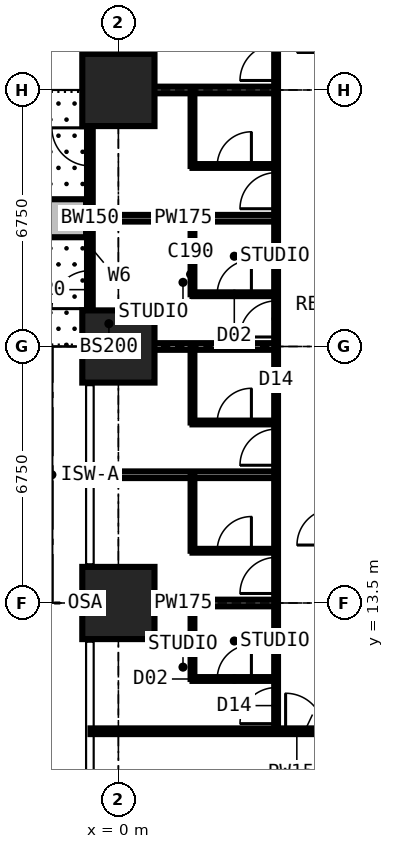
"""IFC4 building model, lengths in metres.
Left out: names, types, materials, properties, quantities, classifications, styles, units other than length and angle.
Written with IfcOpenShell. Run it as: python <this file> out.ifc"""

import sys

from ifc_helpers import new_model, si_unit, direction, frame, frame_2d, origin, origin_2d, place, context, subcontext, project, spatial, rectangle, extrude, element, fill, save


model = new_model("IFC4")
c1 = context("Model", 3, precision=1e-05, world=origin(), true_north=direction((0.0, 1.0)))
c2 = subcontext(c1, "Body", "Model", "MODEL_VIEW")
j1 = project(units=[si_unit("LENGTHUNIT", "METRE"), si_unit("PLANEANGLEUNIT", "RADIAN")], contexts=[c1])
p1 = place(None, origin())
s1 = spatial("IfcSite", under=j1, at=p1, CompositionType="ELEMENT")
p2 = place(p1, origin())
s2 = spatial("IfcBuilding", under=s1, at=p2, CompositionType="ELEMENT")
p3 = place(p2, frame((0.0, 0.0, 36.0)))
s3 = spatial("IfcBuildingStorey", under=s2, at=p3, CompositionType="ELEMENT", Elevation=36.0)
for number, where, z_axis, x_axis in (
    (1, (0.0, 13.5, 0.0), (0.0, 0.0, 1.0), (1.0, 0.0, 0.0)),
    (2, (0.0, 20.25, 0.0), (0.0, 0.0, 1.0), (1.0, 0.0, 0.0)),
    (3, (0.0, 27.0, 0.0), (0.0, 0.0, 1.0), (1.0, 0.0, 0.0)),
):
    element("IfcColumn", number, at=place(p3, frame(where, z_axis=z_axis, x_axis=x_axis)), inside=s3, PredefinedType="COLUMN", context=c2, shape_type="SweptSolid", body=[
        extrude(rectangle(XDim=1.9, YDim=1.9, at=origin_2d()), origin(), (0.0, 0.0, 1.0), 3.6),
    ])
p4 = place(p3, frame((-0.75, 20.25, 0.0), z_axis=(0.0, 0.0, 1.0), x_axis=(0.0, 1.0, 0.0)))
e4 = element("IfcWall", 4, at=p4, inside=s3, PredefinedType="SOLIDWALL", context=c2, shape_type="SweptSolid", body=[
    extrude(rectangle(XDim=6.75, YDim=0.15, at=frame_2d((3.375, 0.0))), origin(), (0.0, 0.0, 1.0), 3.375),
])
p5 = place(p4, frame((0.996, 0.0, 0.0)))
e5 = element("IfcOpeningElement", 5, at=p5, cuts=e4, PredefinedType="OPENING", context=c2, shape_type="SweptSolid", body=[
    extrude(rectangle(XDim=1.0, YDim=2.2, at=frame_2d((0.5, 1.1))), frame((0.0, 0.085, 0.0), z_axis=(0.0, -1.0, 0.0), x_axis=(1.0, 0.0, 0.0)), (0.0, 0.0, 1.0), 0.17),
])
p6 = place(p4, frame((2.042, 0.0, 0.9)))
e6 = element("IfcOpeningElement", 6, at=p6, cuts=e4, PredefinedType="OPENING", context=c2, shape_type="SweptSolid", body=[
    extrude(rectangle(XDim=1.2, YDim=1.8, at=frame_2d((0.6, 0.9))), frame((0.0, 0.085, 0.0), z_axis=(0.0, -1.0, 0.0), x_axis=(1.0, 0.0, 0.0)), (0.0, 0.0, 1.0), 0.17),
])
p7 = place(p4, frame((4.754, 0.0, 0.0)))
e7 = element("IfcOpeningElement", 7, at=p7, cuts=e4, PredefinedType="OPENING", context=c2, shape_type="SweptSolid", body=[
    extrude(rectangle(XDim=1.0, YDim=2.2, at=frame_2d((0.5, 1.1))), frame((0.0, 0.085, 0.0), z_axis=(0.0, -1.0, 0.0), x_axis=(1.0, 0.0, 0.0)), (0.0, 0.0, 1.0), 0.17),
])
p8 = place(p4, frame((3.508, 0.0, 0.9)))
e8 = element("IfcOpeningElement", 8, at=p8, cuts=e4, PredefinedType="OPENING", context=c2, shape_type="SweptSolid", body=[
    extrude(rectangle(XDim=1.2, YDim=1.8, at=frame_2d((0.6, 0.9))), frame((0.0, 0.085, 0.0), z_axis=(0.0, -1.0, 0.0), x_axis=(1.0, 0.0, 0.0)), (0.0, 0.0, 1.0), 0.17),
])
p9 = place(p3, frame((-0.85, 23.625, 0.0), z_axis=(0.0, 0.0, 1.0), x_axis=(-1.0, 0.0, 0.0)))
e9 = element("IfcWall", 9, at=p9, inside=s3, PredefinedType="USERDEFINED", context=c2, shape_type="SweptSolid", body=[
    extrude(rectangle(XDim=2.2, YDim=1.0, at=frame_2d((1.1, 0.0))), origin(), (0.0, 0.0, 1.0), 0.9),
])
p10 = place(p3, frame((-0.734, 10.125, 0.0), z_axis=(0.0, 0.0, 1.0), x_axis=(1.0, 0.0, 0.0)))
e10 = element("IfcWall", 10, at=p10, inside=s3, PredefinedType="PARTITIONING", context=c2, shape_type="SweptSolid", body=[
    extrude(rectangle(XDim=10.859, YDim=0.15, at=frame_2d((5.429, 0.0))), origin(), (0.0, 0.0, 1.0), 3.375),
])
p11 = place(p10, frame((5.134, 0.0, 0.0)))
e11 = element("IfcOpeningElement", 11, at=p11, cuts=e10, PredefinedType="OPENING", context=c2, shape_type="SweptSolid", body=[
    extrude(rectangle(XDim=1.0, YDim=2.2, at=frame_2d((0.5, 1.1))), frame((0.0, 0.085, 0.0), z_axis=(0.0, -1.0, 0.0), x_axis=(1.0, 0.0, 0.0)), (0.0, 0.0, 1.0), 0.17),
])
p12 = place(p3, frame((-0.734, 13.5, 0.0), z_axis=(0.0, 0.0, 1.0), x_axis=(1.0, 0.0, 0.0)))
e12 = element("IfcWall", 12, at=p12, inside=s3, PredefinedType="PARTITIONING", context=c2, shape_type="SweptSolid", body=[
    extrude(rectangle(XDim=4.884, YDim=0.175, at=frame_2d((2.442, 0.0))), origin(), (0.0, 0.0, 1.0), 2.61),
])
p13 = place(p3, frame((-0.734, 16.875, 0.0), z_axis=(0.0, 0.0, 1.0), x_axis=(1.0, 0.0, 0.0)))
e13 = element("IfcWall", 13, at=p13, inside=s3, PredefinedType="PARTITIONING", context=c2, shape_type="SweptSolid", body=[
    extrude(rectangle(XDim=4.884, YDim=0.175, at=frame_2d((2.442, 0.0))), origin(), (0.0, 0.0, 1.0), 3.375),
])
p14 = place(p3, frame((-0.734, 20.25, 0.0), z_axis=(0.0, 0.0, 1.0), x_axis=(1.0, 0.0, 0.0)))
e14 = element("IfcWall", 14, at=p14, inside=s3, PredefinedType="PARTITIONING", context=c2, shape_type="SweptSolid", body=[
    extrude(rectangle(XDim=4.884, YDim=0.175, at=frame_2d((2.442, 0.0))), origin(), (0.0, 0.0, 1.0), 2.61),
])
p15 = place(p3, frame((-0.734, 23.625, 0.0), z_axis=(0.0, 0.0, 1.0), x_axis=(1.0, 0.0, 0.0)))
e15 = element("IfcWall", 15, at=p15, inside=s3, PredefinedType="PARTITIONING", context=c2, shape_type="SweptSolid", body=[
    extrude(rectangle(XDim=4.884, YDim=0.175, at=frame_2d((2.442, 0.0))), origin(), (0.0, 0.0, 1.0), 3.375),
])
p16 = place(p3, frame((-0.734, 27.0, 0.0), z_axis=(0.0, 0.0, 1.0), x_axis=(1.0, 0.0, 0.0)))
e16 = element("IfcWall", 16, at=p16, inside=s3, PredefinedType="PARTITIONING", context=c2, shape_type="SweptSolid", body=[
    extrude(rectangle(XDim=4.884, YDim=0.175, at=frame_2d((2.442, 0.0))), origin(), (0.0, 0.0, 1.0), 2.877),
])
p17 = place(p3, frame((1.95, 11.5, 0.0), z_axis=(0.0, 0.0, 1.0), x_axis=(0.0, 1.0, 0.0)))
e17 = element("IfcWall", 17, at=p17, inside=s3, PredefinedType="PARTITIONING", context=c2, shape_type="SweptSolid", body=[
    extrude(rectangle(XDim=2.0, YDim=0.1, at=frame_2d((1.0, 0.0))), origin(), (0.0, 0.0, 1.0), 3.375),
])
p18 = place(p3, frame((1.95, 11.5, 0.0), z_axis=(0.0, 0.0, 1.0), x_axis=(1.0, 0.0, 0.0)))
e18 = element("IfcWall", 18, at=p18, inside=s3, PredefinedType="PARTITIONING", context=c2, shape_type="SweptSolid", body=[
    extrude(rectangle(XDim=2.2, YDim=0.1, at=frame_2d((1.1, 0.0))), origin(), (0.0, 0.0, 1.0), 3.375),
])
p19 = place(p18, frame((0.65, 0.0, 0.0)))
e19 = element("IfcOpeningElement", 19, at=p19, cuts=e18, PredefinedType="OPENING", context=c2, shape_type="SweptSolid", body=[
    extrude(rectangle(XDim=0.9, YDim=2.2, at=frame_2d((0.45, 1.1))), frame((0.0, 0.06, 0.0), z_axis=(0.0, -1.0, 0.0), x_axis=(1.0, 0.0, 0.0)), (0.0, 0.0, 1.0), 0.12),
])
p20 = place(p3, frame((1.95, 14.875, 0.0), z_axis=(0.0, 0.0, 1.0), x_axis=(0.0, 1.0, 0.0)))
e20 = element("IfcWall", 20, at=p20, inside=s3, PredefinedType="PARTITIONING", context=c2, shape_type="SweptSolid", body=[
    extrude(rectangle(XDim=2.0, YDim=0.1, at=frame_2d((1.0, 0.0))), origin(), (0.0, 0.0, 1.0), 3.375),
])
p21 = place(p3, frame((1.95, 14.875, 0.0), z_axis=(0.0, 0.0, 1.0), x_axis=(1.0, 0.0, 0.0)))
e21 = element("IfcWall", 21, at=p21, inside=s3, PredefinedType="PARTITIONING", context=c2, shape_type="SweptSolid", body=[
    extrude(rectangle(XDim=2.2, YDim=0.1, at=frame_2d((1.1, 0.0))), origin(), (0.0, 0.0, 1.0), 3.375),
])
p22 = place(p21, frame((0.65, 0.0, 0.0)))
e22 = element("IfcOpeningElement", 22, at=p22, cuts=e21, PredefinedType="OPENING", context=c2, shape_type="SweptSolid", body=[
    extrude(rectangle(XDim=0.9, YDim=2.2, at=frame_2d((0.45, 1.1))), frame((0.0, 0.06, 0.0), z_axis=(0.0, -1.0, 0.0), x_axis=(1.0, 0.0, 0.0)), (0.0, 0.0, 1.0), 0.12),
])
p23 = place(p3, frame((1.95, 18.25, 0.0), z_axis=(0.0, 0.0, 1.0), x_axis=(0.0, 1.0, 0.0)))
e23 = element("IfcWall", 23, at=p23, inside=s3, PredefinedType="PARTITIONING", context=c2, shape_type="SweptSolid", body=[
    extrude(rectangle(XDim=2.0, YDim=0.1, at=frame_2d((1.0, 0.0))), origin(), (0.0, 0.0, 1.0), 3.375),
])
p24 = place(p3, frame((1.95, 18.25, 0.0), z_axis=(0.0, 0.0, 1.0), x_axis=(1.0, 0.0, 0.0)))
e24 = element("IfcWall", 24, at=p24, inside=s3, PredefinedType="PARTITIONING", context=c2, shape_type="SweptSolid", body=[
    extrude(rectangle(XDim=2.2, YDim=0.1, at=frame_2d((1.1, 0.0))), origin(), (0.0, 0.0, 1.0), 3.375),
])
p25 = place(p24, frame((0.65, 0.0, 0.0)))
e25 = element("IfcOpeningElement", 25, at=p25, cuts=e24, PredefinedType="OPENING", context=c2, shape_type="SweptSolid", body=[
    extrude(rectangle(XDim=0.9, YDim=2.2, at=frame_2d((0.45, 1.1))), frame((0.0, 0.06, 0.0), z_axis=(0.0, -1.0, 0.0), x_axis=(1.0, 0.0, 0.0)), (0.0, 0.0, 1.0), 0.12),
])
p26 = place(p3, frame((1.95, 21.625, 0.0), z_axis=(0.0, 0.0, 1.0), x_axis=(0.0, 1.0, 0.0)))
e26 = element("IfcWall", 26, at=p26, inside=s3, PredefinedType="PARTITIONING", context=c2, shape_type="SweptSolid", body=[
    extrude(rectangle(XDim=2.0, YDim=0.1, at=frame_2d((1.0, 0.0))), origin(), (0.0, 0.0, 1.0), 3.375),
])
p27 = place(p3, frame((1.95, 21.625, 0.0), z_axis=(0.0, 0.0, 1.0), x_axis=(1.0, 0.0, 0.0)))
e27 = element("IfcWall", 27, at=p27, inside=s3, PredefinedType="PARTITIONING", context=c2, shape_type="SweptSolid", body=[
    extrude(rectangle(XDim=2.2, YDim=0.1, at=frame_2d((1.1, 0.0))), origin(), (0.0, 0.0, 1.0), 3.375),
])
p28 = place(p27, frame((0.65, 0.0, 0.0)))
e28 = element("IfcOpeningElement", 28, at=p28, cuts=e27, PredefinedType="OPENING", context=c2, shape_type="SweptSolid", body=[
    extrude(rectangle(XDim=0.9, YDim=2.2, at=frame_2d((0.45, 1.1))), frame((0.0, 0.06, 0.0), z_axis=(0.0, -1.0, 0.0), x_axis=(1.0, 0.0, 0.0)), (0.0, 0.0, 1.0), 0.12),
])
p29 = place(p3, frame((1.95, 25.0, 0.0), z_axis=(0.0, 0.0, 1.0), x_axis=(0.0, 1.0, 0.0)))
e29 = element("IfcWall", 29, at=p29, inside=s3, PredefinedType="PARTITIONING", context=c2, shape_type="SweptSolid", body=[
    extrude(rectangle(XDim=2.0, YDim=0.1, at=frame_2d((1.0, 0.0))), origin(), (0.0, 0.0, 1.0), 3.375),
])
p30 = place(p3, frame((1.95, 25.0, 0.0), z_axis=(0.0, 0.0, 1.0), x_axis=(1.0, 0.0, 0.0)))
e30 = element("IfcWall", 30, at=p30, inside=s3, PredefinedType="PARTITIONING", context=c2, shape_type="SweptSolid", body=[
    extrude(rectangle(XDim=2.2, YDim=0.1, at=frame_2d((1.1, 0.0))), origin(), (0.0, 0.0, 1.0), 3.375),
])
p31 = place(p30, frame((0.65, 0.0, 0.0)))
e31 = element("IfcOpeningElement", 31, at=p31, cuts=e30, PredefinedType="OPENING", context=c2, shape_type="SweptSolid", body=[
    extrude(rectangle(XDim=0.9, YDim=2.2, at=frame_2d((0.45, 1.1))), frame((0.0, 0.06, 0.0), z_axis=(0.0, -1.0, 0.0), x_axis=(1.0, 0.0, 0.0)), (0.0, 0.0, 1.0), 0.12),
])
p32 = place(p3, frame((4.15, 10.125, 0.0), z_axis=(0.0, 0.0, 1.0), x_axis=(0.0, 1.0, 0.0)))
e32 = element("IfcWall", 32, at=p32, inside=s3, PredefinedType="PARTITIONING", context=c2, shape_type="SweptSolid", body=[
    extrude(rectangle(XDim=23.625, YDim=0.1, at=frame_2d((11.812, 0.0))), origin(), (0.0, 0.0, 1.0), 3.375),
])
p33 = place(p32, frame((0.2, 0.0, 0.0)))
e33 = element("IfcOpeningElement", 33, at=p33, cuts=e32, PredefinedType="OPENING", context=c2, shape_type="SweptSolid", body=[
    extrude(rectangle(XDim=0.95, YDim=2.2, at=frame_2d((0.475, 1.1))), frame((0.0, 0.06, 0.0), z_axis=(0.0, -1.0, 0.0), x_axis=(1.0, 0.0, 0.0)), (0.0, 0.0, 1.0), 0.12),
])
p34 = place(p32, frame((3.625, 0.0, 0.0)))
e34 = element("IfcOpeningElement", 34, at=p34, cuts=e32, PredefinedType="OPENING", context=c2, shape_type="SweptSolid", body=[
    extrude(rectangle(XDim=0.95, YDim=2.2, at=frame_2d((0.475, 1.1))), frame((0.0, 0.06, 0.0), z_axis=(0.0, -1.0, 0.0), x_axis=(1.0, 0.0, 0.0)), (0.0, 0.0, 1.0), 0.12),
])
p35 = place(p32, frame((7.0, 0.0, 0.0)))
e35 = element("IfcOpeningElement", 35, at=p35, cuts=e32, PredefinedType="OPENING", context=c2, shape_type="SweptSolid", body=[
    extrude(rectangle(XDim=0.95, YDim=2.2, at=frame_2d((0.475, 1.1))), frame((0.0, 0.06, 0.0), z_axis=(0.0, -1.0, 0.0), x_axis=(1.0, 0.0, 0.0)), (0.0, 0.0, 1.0), 0.12),
])
p36 = place(p32, frame((10.375, 0.0, 0.0)))
e36 = element("IfcOpeningElement", 36, at=p36, cuts=e32, PredefinedType="OPENING", context=c2, shape_type="SweptSolid", body=[
    extrude(rectangle(XDim=0.95, YDim=2.2, at=frame_2d((0.475, 1.1))), frame((0.0, 0.06, 0.0), z_axis=(0.0, -1.0, 0.0), x_axis=(1.0, 0.0, 0.0)), (0.0, 0.0, 1.0), 0.12),
])
p37 = place(p32, frame((13.75, 0.0, 0.0)))
e37 = element("IfcOpeningElement", 37, at=p37, cuts=e32, PredefinedType="OPENING", context=c2, shape_type="SweptSolid", body=[
    extrude(rectangle(XDim=0.95, YDim=2.2, at=frame_2d((0.475, 1.1))), frame((0.0, 0.06, 0.0), z_axis=(0.0, -1.0, 0.0), x_axis=(1.0, 0.0, 0.0)), (0.0, 0.0, 1.0), 0.12),
])
p38 = place(p32, frame((17.125, 0.0, 0.0)))
e38 = element("IfcOpeningElement", 38, at=p38, cuts=e32, PredefinedType="OPENING", context=c2, shape_type="SweptSolid", body=[
    extrude(rectangle(XDim=0.95, YDim=2.2, at=frame_2d((0.475, 1.1))), frame((0.0, 0.06, 0.0), z_axis=(0.0, -1.0, 0.0), x_axis=(1.0, 0.0, 0.0)), (0.0, 0.0, 1.0), 0.12),
])
p39 = place(p5, origin())
e39 = element("IfcDoor", 39, at=p39, inside=s3, OperationType="SINGLE_SWING_LEFT", PredefinedType="DOOR", context=c2, shape_type="SweptSolid", body=[
    extrude(rectangle(XDim=1.0, YDim=2.2, at=frame_2d((0.5, 1.1))), frame((0.0, 0.025, 0.0), z_axis=(0.0, -1.0, 0.0), x_axis=(1.0, 0.0, 0.0)), (0.0, 0.0, 1.0), 0.05),
])
fill(e5, e39)
p40 = place(p6, origin())
e40 = element("IfcWindow", 40, at=p40, inside=s3, PartitioningType="SINGLE_PANEL", PredefinedType="WINDOW", context=c2, shape_type="SweptSolid", body=[
    extrude(rectangle(XDim=1.2, YDim=1.8, at=frame_2d((0.6, 0.9))), frame((0.0, 0.03, 0.0), z_axis=(0.0, -1.0, 0.0), x_axis=(1.0, 0.0, 0.0)), (0.0, 0.0, 1.0), 0.06),
])
fill(e6, e40)
p41 = place(p7, origin())
e41 = element("IfcDoor", 41, at=p41, inside=s3, OperationType="SINGLE_SWING_RIGHT", PredefinedType="DOOR", context=c2, shape_type="SweptSolid", body=[
    extrude(rectangle(XDim=1.0, YDim=2.2, at=frame_2d((0.5, 1.1))), frame((0.0, 0.025, 0.0), z_axis=(0.0, -1.0, 0.0), x_axis=(1.0, 0.0, 0.0)), (0.0, 0.0, 1.0), 0.05),
])
fill(e7, e41)
p42 = place(p8, origin())
e42 = element("IfcWindow", 42, at=p42, inside=s3, PartitioningType="SINGLE_PANEL", PredefinedType="WINDOW", context=c2, shape_type="SweptSolid", body=[
    extrude(rectangle(XDim=1.2, YDim=1.8, at=frame_2d((0.6, 0.9))), frame((0.0, 0.03, 0.0), z_axis=(0.0, -1.0, 0.0), x_axis=(1.0, 0.0, 0.0)), (0.0, 0.0, 1.0), 0.06),
])
fill(e8, e42)
p43 = place(p11, origin())
e43 = element("IfcDoor", 43, at=p43, inside=s3, OperationType="SINGLE_SWING_LEFT", PredefinedType="DOOR", context=c2, shape_type="SweptSolid", body=[
    extrude(rectangle(XDim=1.0, YDim=2.2, at=frame_2d((0.5, 1.1))), frame((0.0, 0.025, 0.0), z_axis=(0.0, -1.0, 0.0), x_axis=(1.0, 0.0, 0.0)), (0.0, 0.0, 1.0), 0.05),
])
fill(e11, e43)
p44 = place(p33, origin())
e44 = element("IfcDoor", 44, at=p44, inside=s3, OperationType="SINGLE_SWING_LEFT", PredefinedType="DOOR", context=c2, shape_type="SweptSolid", body=[
    extrude(rectangle(XDim=0.95, YDim=2.2, at=frame_2d((0.475, 1.1))), frame((0.0, 0.025, 0.0), z_axis=(0.0, -1.0, 0.0), x_axis=(1.0, 0.0, 0.0)), (0.0, 0.0, 1.0), 0.05),
])
fill(e33, e44)
p45 = place(p19, origin())
e45 = element("IfcDoor", 45, at=p45, inside=s3, OperationType="SINGLE_SWING_RIGHT", PredefinedType="DOOR", context=c2, shape_type="SweptSolid", body=[
    extrude(rectangle(XDim=0.9, YDim=2.2, at=frame_2d((0.45, 1.1))), frame((0.0, 0.025, 0.0), z_axis=(0.0, -1.0, 0.0), x_axis=(1.0, 0.0, 0.0)), (0.0, 0.0, 1.0), 0.05),
])
fill(e19, e45)
p46 = place(p34, origin())
e46 = element("IfcDoor", 46, at=p46, inside=s3, OperationType="SINGLE_SWING_LEFT", PredefinedType="DOOR", context=c2, shape_type="SweptSolid", body=[
    extrude(rectangle(XDim=0.95, YDim=2.2, at=frame_2d((0.475, 1.1))), frame((0.0, 0.025, 0.0), z_axis=(0.0, -1.0, 0.0), x_axis=(1.0, 0.0, 0.0)), (0.0, 0.0, 1.0), 0.05),
])
fill(e34, e46)
p47 = place(p22, origin())
e47 = element("IfcDoor", 47, at=p47, inside=s3, OperationType="SINGLE_SWING_RIGHT", PredefinedType="DOOR", context=c2, shape_type="SweptSolid", body=[
    extrude(rectangle(XDim=0.9, YDim=2.2, at=frame_2d((0.45, 1.1))), frame((0.0, 0.025, 0.0), z_axis=(0.0, -1.0, 0.0), x_axis=(1.0, 0.0, 0.0)), (0.0, 0.0, 1.0), 0.05),
])
fill(e22, e47)
p48 = place(p35, origin())
e48 = element("IfcDoor", 48, at=p48, inside=s3, OperationType="SINGLE_SWING_LEFT", PredefinedType="DOOR", context=c2, shape_type="SweptSolid", body=[
    extrude(rectangle(XDim=0.95, YDim=2.2, at=frame_2d((0.475, 1.1))), frame((0.0, 0.025, 0.0), z_axis=(0.0, -1.0, 0.0), x_axis=(1.0, 0.0, 0.0)), (0.0, 0.0, 1.0), 0.05),
])
fill(e35, e48)
p49 = place(p25, origin())
e49 = element("IfcDoor", 49, at=p49, inside=s3, OperationType="SINGLE_SWING_RIGHT", PredefinedType="DOOR", context=c2, shape_type="SweptSolid", body=[
    extrude(rectangle(XDim=0.9, YDim=2.2, at=frame_2d((0.45, 1.1))), frame((0.0, 0.025, 0.0), z_axis=(0.0, -1.0, 0.0), x_axis=(1.0, 0.0, 0.0)), (0.0, 0.0, 1.0), 0.05),
])
fill(e25, e49)
p50 = place(p36, origin())
e50 = element("IfcDoor", 50, at=p50, inside=s3, OperationType="SINGLE_SWING_LEFT", PredefinedType="DOOR", context=c2, shape_type="SweptSolid", body=[
    extrude(rectangle(XDim=0.95, YDim=2.2, at=frame_2d((0.475, 1.1))), frame((0.0, 0.025, 0.0), z_axis=(0.0, -1.0, 0.0), x_axis=(1.0, 0.0, 0.0)), (0.0, 0.0, 1.0), 0.05),
])
fill(e36, e50)
p51 = place(p28, origin())
e51 = element("IfcDoor", 51, at=p51, inside=s3, OperationType="SINGLE_SWING_RIGHT", PredefinedType="DOOR", context=c2, shape_type="SweptSolid", body=[
    extrude(rectangle(XDim=0.9, YDim=2.2, at=frame_2d((0.45, 1.1))), frame((0.0, 0.025, 0.0), z_axis=(0.0, -1.0, 0.0), x_axis=(1.0, 0.0, 0.0)), (0.0, 0.0, 1.0), 0.05),
])
fill(e28, e51)
p52 = place(p37, origin())
e52 = element("IfcDoor", 52, at=p52, inside=s3, OperationType="SINGLE_SWING_LEFT", PredefinedType="DOOR", context=c2, shape_type="SweptSolid", body=[
    extrude(rectangle(XDim=0.95, YDim=2.2, at=frame_2d((0.475, 1.1))), frame((0.0, 0.025, 0.0), z_axis=(0.0, -1.0, 0.0), x_axis=(1.0, 0.0, 0.0)), (0.0, 0.0, 1.0), 0.05),
])
fill(e37, e52)
p53 = place(p31, origin())
e53 = element("IfcDoor", 53, at=p53, inside=s3, OperationType="SINGLE_SWING_RIGHT", PredefinedType="DOOR", context=c2, shape_type="SweptSolid", body=[
    extrude(rectangle(XDim=0.9, YDim=2.2, at=frame_2d((0.45, 1.1))), frame((0.0, 0.025, 0.0), z_axis=(0.0, -1.0, 0.0), x_axis=(1.0, 0.0, 0.0)), (0.0, 0.0, 1.0), 0.05),
])
fill(e31, e53)
p54 = place(p38, origin())
e54 = element("IfcDoor", 54, at=p54, inside=s3, OperationType="SINGLE_SWING_LEFT", PredefinedType="DOOR", context=c2, shape_type="SweptSolid", body=[
    extrude(rectangle(XDim=0.95, YDim=2.2, at=frame_2d((0.475, 1.1))), frame((0.0, 0.025, 0.0), z_axis=(0.0, -1.0, 0.0), x_axis=(1.0, 0.0, 0.0)), (0.0, 0.0, 1.0), 0.05),
])
fill(e38, e54)
save(model, sys.argv[1])
